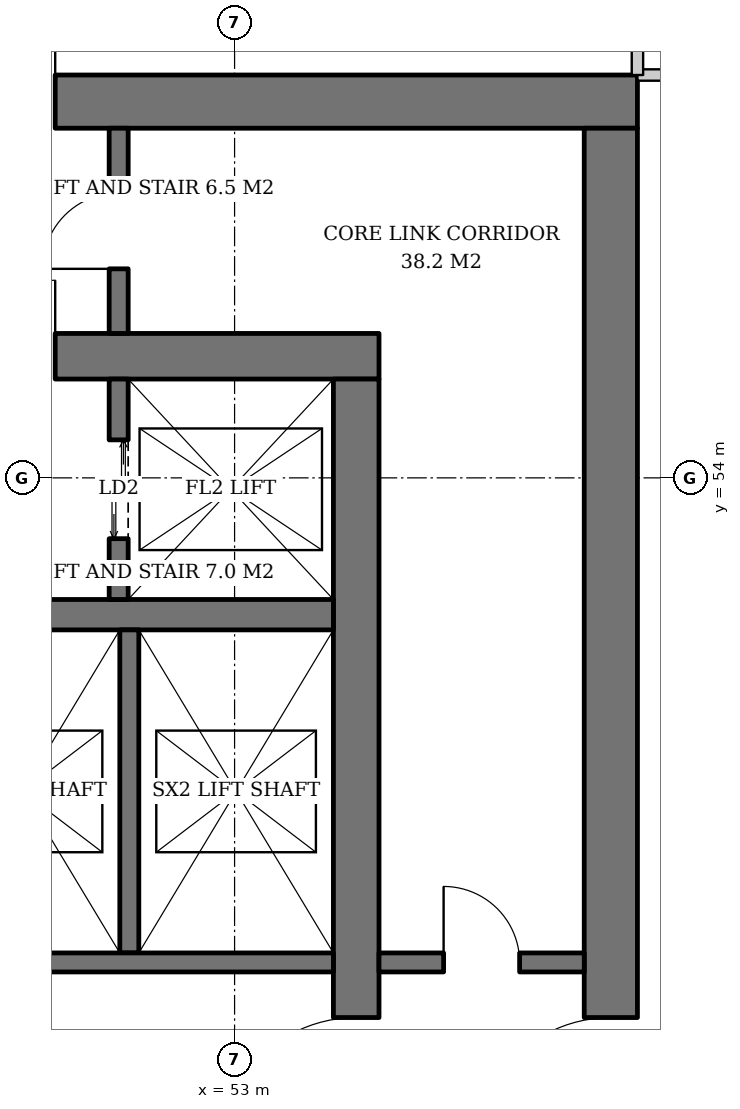
"""IFC4 building model, lengths in metres.
Left out: names, types, materials, properties, quantities, classifications, styles, units other than length and angle.
Written with IfcOpenShell. Run it as: python <this file> out.ifc"""

import sys

from ifc_helpers import new_model, si_unit, direction, frame, frame_2d, origin, origin_2d, place, context, subcontext, project, spatial, rectangle, extrude, element, fill, save


model = new_model("IFC4")
c1 = context("Model", 3, precision=1e-05, world=origin(), true_north=direction((0.0, 1.0)))
c2 = subcontext(c1, "Body", "Model", "MODEL_VIEW")
j1 = project(units=[si_unit("LENGTHUNIT", "METRE"), si_unit("PLANEANGLEUNIT", "RADIAN")], contexts=[c1])
p1 = place(None, origin())
s1 = spatial("IfcSite", under=j1, at=p1, CompositionType="ELEMENT")
p2 = place(p1, origin())
s2 = spatial("IfcBuilding", under=s1, at=p2, CompositionType="ELEMENT")
p3 = place(p2, frame((0.0, 0.0, 161.6)))
s3 = spatial("IfcBuildingStorey", under=s2, at=p3, CompositionType="ELEMENT", Elevation=161.6)
p4 = place(p3, frame((60.407, 61.407, 0.0), z_axis=(-0.031964207655, -0.031964207655, 0.998977766949), x_axis=(0.707106781187, -0.707106781187, 0.0)))
e1 = element("IfcColumn", 1, at=p4, inside=s3, PredefinedType="COLUMN", context=c2, shape_type="SweptSolid", body=[
    extrude(rectangle(XDim=2.4, YDim=2.4, at=origin_2d()), origin(), (0.0, 0.0, 1.0), 3.804),
])
p5 = place(p3, frame((35.1, 55.6, 0.0), z_axis=(0.0, 0.0, 1.0), x_axis=(1.0, 0.0, 0.0)))
e2 = element("IfcWall", 2, at=p5, inside=s3, PredefinedType="SHEAR", context=c2, shape_type="SweptSolid", body=[
    extrude(rectangle(XDim=19.8, YDim=0.6, at=frame_2d((9.9, 0.0))), origin(), (0.0, 0.0, 1.0), 3.8),
])
p6 = place(p5, frame((14.54, 0.0, 0.0)))
e3 = element("IfcOpeningElement", 3, at=p6, cuts=e2, PredefinedType="OPENING", context=c2, shape_type="SweptSolid", body=[
    extrude(rectangle(XDim=1.0, YDim=2.1, at=frame_2d((0.5, 1.05))), frame((0.0, 0.31, 0.0), z_axis=(0.0, -1.0, 0.0), x_axis=(1.0, 0.0, 0.0)), (0.0, 0.0, 1.0), 0.62),
])
p7 = place(p5, frame((2.425, 0.0, 0.0)))
e4 = element("IfcOpeningElement", 4, at=p7, cuts=e2, PredefinedType="OPENING", context=c2, shape_type="SweptSolid", body=[
    extrude(rectangle(XDim=1.0, YDim=2.1, at=frame_2d((0.5, 1.05))), frame((0.0, 0.31, 0.0), z_axis=(0.0, -1.0, 0.0), x_axis=(1.0, 0.0, 0.0)), (0.0, 0.0, 1.0), 0.62),
])
p8 = place(p3, frame((54.6, 36.7, 0.0), z_axis=(0.0, 0.0, 1.0), x_axis=(0.0, 1.0, 0.0)))
e5 = element("IfcWall", 5, at=p8, inside=s3, PredefinedType="SHEAR", context=c2, shape_type="SweptSolid", body=[
    extrude(rectangle(XDim=18.6, YDim=0.6, at=frame_2d((9.3, 0.0))), origin(), (0.0, 0.0, 1.0), 3.8),
])
p9 = place(p8, frame((8.4, 0.0, 0.0)))
e6 = element("IfcOpeningElement", 6, at=p9, cuts=e5, PredefinedType="OPENING", context=c2, shape_type="SweptSolid", body=[
    extrude(rectangle(XDim=1.8, YDim=2.4, at=frame_2d((0.9, 1.2))), frame((0.0, 0.31, 0.0), z_axis=(0.0, -1.0, 0.0), x_axis=(1.0, 0.0, 0.0)), (0.0, 0.0, 1.0), 0.62),
])
p10 = place(p3, frame((31.7, 58.95, 0.0), z_axis=(0.0, 0.0, 1.0), x_axis=(1.0, 0.0, 0.0)))
e7 = element("IfcWall", 7, at=p10, inside=s3, PredefinedType="SHEAR", context=c2, shape_type="SweptSolid", body=[
    extrude(rectangle(XDim=26.6, YDim=0.7, at=frame_2d((13.3, 0.0))), origin(), (0.0, 0.0, 1.0), 3.8),
])
p11 = place(p10, frame((17.94, 0.0, 0.0)))
e8 = element("IfcOpeningElement", 8, at=p11, cuts=e7, PredefinedType="OPENING", context=c2, shape_type="SweptSolid", body=[
    extrude(rectangle(XDim=1.0, YDim=2.1, at=frame_2d((0.5, 1.05))), frame((0.0, 0.36, 0.0), z_axis=(0.0, -1.0, 0.0), x_axis=(1.0, 0.0, 0.0)), (0.0, 0.0, 1.0), 0.72),
])
p12 = place(p10, frame((5.825, 0.0, 0.0)))
e9 = element("IfcOpeningElement", 9, at=p12, cuts=e7, PredefinedType="OPENING", context=c2, shape_type="SweptSolid", body=[
    extrude(rectangle(XDim=1.0, YDim=2.1, at=frame_2d((0.5, 1.05))), frame((0.0, 0.36, 0.0), z_axis=(0.0, -1.0, 0.0), x_axis=(1.0, 0.0, 0.0)), (0.0, 0.0, 1.0), 0.72),
])
p13 = place(p10, frame((1.837, 0.0, 0.0)))
e10 = element("IfcOpeningElement", 10, at=p13, cuts=e7, PredefinedType="OPENING", context=c2, shape_type="SweptSolid", body=[
    extrude(rectangle(XDim=1.0, YDim=2.1, at=frame_2d((0.5, 1.05))), frame((0.0, 0.36, 0.0), z_axis=(0.0, -1.0, 0.0), x_axis=(1.0, 0.0, 0.0)), (0.0, 0.0, 1.0), 0.72),
])
p14 = place(p10, frame((3.781, 0.0, 0.0)))
e11 = element("IfcOpeningElement", 11, at=p14, cuts=e7, PredefinedType="OPENING", context=c2, shape_type="SweptSolid", body=[
    extrude(rectangle(XDim=1.0, YDim=2.1, at=frame_2d((0.5, 1.05))), frame((0.0, 0.36, 0.0), z_axis=(0.0, -1.0, 0.0), x_axis=(1.0, 0.0, 0.0)), (0.0, 0.0, 1.0), 0.72),
])
p15 = place(p3, frame((57.95, 33.4, 0.0), z_axis=(0.0, 0.0, 1.0), x_axis=(0.0, 1.0, 0.0)))
e12 = element("IfcWall", 12, at=p15, inside=s3, PredefinedType="SHEAR", context=c2, shape_type="SweptSolid", body=[
    extrude(rectangle(XDim=25.2, YDim=0.7, at=frame_2d((12.6, 0.0))), origin(), (0.0, 0.0, 1.0), 3.8),
])
p16 = place(p15, frame((11.7, 0.0, 0.0)))
e13 = element("IfcOpeningElement", 13, at=p16, cuts=e12, PredefinedType="OPENING", context=c2, shape_type="SweptSolid", body=[
    extrude(rectangle(XDim=1.8, YDim=2.4, at=frame_2d((0.9, 1.2))), frame((0.0, 0.36, 0.0), z_axis=(0.0, -1.0, 0.0), x_axis=(1.0, 0.0, 0.0)), (0.0, 0.0, 1.0), 0.72),
])
p17 = place(p3, frame((35.7, 52.2, 0.0), z_axis=(0.0, 0.0, 1.0), x_axis=(1.0, 0.0, 0.0)))
e14 = element("IfcWall", 14, at=p17, inside=s3, PredefinedType="SHEAR", context=c2, shape_type="SweptSolid", body=[
    extrude(rectangle(XDim=18.6, YDim=0.4, at=frame_2d((9.3, 0.0))), origin(), (0.0, 0.0, 1.0), 3.8),
])
p18 = place(p3, frame((51.475, 52.4, 0.0), z_axis=(0.0, 0.0, 1.0), x_axis=(0.0, 1.0, 0.0)))
e15 = element("IfcWall", 15, at=p18, inside=s3, PredefinedType="SHEAR", context=c2, shape_type="SweptSolid", body=[
    extrude(rectangle(XDim=2.9, YDim=0.25, at=frame_2d((1.45, 0.0))), origin(), (0.0, 0.0, 1.0), 3.8),
])
p19 = place(p18, frame((0.8, 0.0, 0.0)))
e16 = element("IfcOpeningElement", 16, at=p19, cuts=e15, PredefinedType="OPENING", context=c2, shape_type="SweptSolid", body=[
    extrude(rectangle(XDim=1.3, YDim=2.2, at=frame_2d((0.65, 1.1))), frame((0.0, 0.135, 0.0), z_axis=(0.0, -1.0, 0.0), x_axis=(1.0, 0.0, 0.0)), (0.0, 0.0, 1.0), 0.27),
])
p20 = place(p3, frame((51.615, 47.75, 0.0), z_axis=(0.0, 0.0, 1.0), x_axis=(0.0, 1.0, 0.0)))
e17 = element("IfcWall", 17, at=p20, inside=s3, PredefinedType="SHEAR", context=c2, shape_type="SweptSolid", body=[
    extrude(rectangle(XDim=4.25, YDim=0.25, at=frame_2d((2.125, 0.0))), origin(), (0.0, 0.0, 1.0), 3.8),
])
p21 = place(p3, frame((48.93, 47.625, 0.0), z_axis=(0.0, 0.0, 1.0), x_axis=(1.0, 0.0, 0.0)))
e18 = element("IfcWall", 18, at=p21, inside=s3, PredefinedType="SHEAR", context=c2, shape_type="SweptSolid", body=[
    extrude(rectangle(XDim=5.37, YDim=0.25, at=frame_2d((2.685, 0.0))), origin(), (0.0, 0.0, 1.0), 3.8),
])
p22 = place(p3, frame((51.475, 55.9, 0.0), z_axis=(0.0, 0.0, 1.0), x_axis=(0.0, 1.0, 0.0)))
e19 = element("IfcWall", 19, at=p22, inside=s3, PredefinedType="SOLIDWALL", context=c2, shape_type="SweptSolid", body=[
    extrude(rectangle(XDim=2.7, YDim=0.25, at=frame_2d((1.35, 0.0))), origin(), (0.0, 0.0, 1.0), 3.2),
])
p23 = place(p22, frame((0.85, 0.0, 0.0)))
e20 = element("IfcOpeningElement", 20, at=p23, cuts=e19, PredefinedType="OPENING", context=c2, shape_type="SweptSolid", body=[
    extrude(rectangle(XDim=1.0, YDim=2.1, at=frame_2d((0.5, 1.05))), frame((0.0, 0.135, 0.0), z_axis=(0.0, -1.0, 0.0), x_axis=(1.0, 0.0, 0.0)), (0.0, 0.0, 1.0), 0.27),
])
p24 = place(p3, frame((54.9, 47.625, 0.0), z_axis=(0.0, 0.0, 1.0), x_axis=(1.0, 0.0, 0.0)))
e21 = element("IfcWall", 21, at=p24, inside=s3, PredefinedType="SOLIDWALL", context=c2, shape_type="SweptSolid", body=[
    extrude(rectangle(XDim=2.7, YDim=0.25, at=frame_2d((1.35, 0.0))), origin(), (0.0, 0.0, 1.0), 3.2),
])
p25 = place(p24, frame((0.85, 0.0, 0.0)))
e22 = element("IfcOpeningElement", 22, at=p25, cuts=e21, PredefinedType="OPENING", context=c2, shape_type="SweptSolid", body=[
    extrude(rectangle(XDim=1.0, YDim=2.1, at=frame_2d((0.5, 1.05))), frame((0.0, 0.135, 0.0), z_axis=(0.0, -1.0, 0.0), x_axis=(1.0, 0.0, 0.0)), (0.0, 0.0, 1.0), 0.27),
])
for number, where, z_axis, x_axis in (
    (23, (58.3, 59.3, 0.0), (0.0, 0.0, 1.0), (1.0, 0.0, 0.0)),
    (24, (58.3, 59.3, 0.0), (0.0, 0.0, 1.0), (0.0, 1.0, 0.0)),
):
    element("IfcWall", number, at=place(p3, frame(where, z_axis=z_axis, x_axis=x_axis)), inside=s3, PredefinedType="PARTITIONING", context=c2, shape_type="SweptSolid", body=[
        extrude(rectangle(XDim=1.829, YDim=0.15, at=frame_2d((0.915, 0.0))), origin(), (0.0, 0.0, 1.0), 3.6),
    ])
p26 = place(p19, origin())
e25 = element("IfcDoor", 25, at=p26, inside=s3, OperationType="DOUBLE_DOOR_SLIDING", PredefinedType="DOOR", context=c2, shape_type="SweptSolid", body=[
    extrude(rectangle(XDim=1.3, YDim=2.2, at=frame_2d((0.65, 1.1))), frame((0.0, 0.025, 0.0), z_axis=(0.0, -1.0, 0.0), x_axis=(1.0, 0.0, 0.0)), (0.0, 0.0, 1.0), 0.05),
])
fill(e16, e25)
p27 = place(p23, origin())
e26 = element("IfcDoor", 26, at=p27, inside=s3, OperationType="SINGLE_SWING_LEFT", PredefinedType="DOOR", context=c2, shape_type="SweptSolid", body=[
    extrude(rectangle(XDim=1.0, YDim=2.1, at=frame_2d((0.5, 1.05))), frame((0.0, 0.025, 0.0), z_axis=(0.0, -1.0, 0.0), x_axis=(1.0, 0.0, 0.0)), (0.0, 0.0, 1.0), 0.05),
])
fill(e20, e26)
p28 = place(p25, origin())
e27 = element("IfcDoor", 27, at=p28, inside=s3, OperationType="SINGLE_SWING_LEFT", PredefinedType="DOOR", context=c2, shape_type="SweptSolid", body=[
    extrude(rectangle(XDim=1.0, YDim=2.1, at=frame_2d((0.5, 1.05))), frame((0.0, 0.025, 0.0), z_axis=(0.0, -1.0, 0.0), x_axis=(1.0, 0.0, 0.0)), (0.0, 0.0, 1.0), 0.05),
])
fill(e22, e27)
p29 = place(p6, origin())
e28 = element("IfcDoor", 28, at=p29, inside=s3, OperationType="SINGLE_SWING_RIGHT", PredefinedType="DOOR", context=c2, shape_type="SweptSolid", body=[
    extrude(rectangle(XDim=1.0, YDim=2.1, at=frame_2d((0.5, 1.05))), frame((0.0, 0.025, 0.0), z_axis=(0.0, -1.0, 0.0), x_axis=(1.0, 0.0, 0.0)), (0.0, 0.0, 1.0), 0.05),
])
fill(e3, e28)
p30 = place(p9, origin())
e29 = element("IfcDoor", 29, at=p30, inside=s3, OperationType="DOUBLE_DOOR_SINGLE_SWING", PredefinedType="DOOR", context=c2, shape_type="SweptSolid", body=[
    extrude(rectangle(XDim=1.8, YDim=2.4, at=frame_2d((0.9, 1.2))), frame((0.0, 0.025, 0.0), z_axis=(0.0, -1.0, 0.0), x_axis=(1.0, 0.0, 0.0)), (0.0, 0.0, 1.0), 0.05),
])
fill(e6, e29)
p31 = place(p16, origin())
e30 = element("IfcDoor", 30, at=p31, inside=s3, OperationType="DOUBLE_DOOR_SINGLE_SWING", PredefinedType="DOOR", context=c2, shape_type="SweptSolid", body=[
    extrude(rectangle(XDim=1.8, YDim=2.4, at=frame_2d((0.9, 1.2))), frame((0.0, 0.025, 0.0), z_axis=(0.0, -1.0, 0.0), x_axis=(1.0, 0.0, 0.0)), (0.0, 0.0, 1.0), 0.05),
])
fill(e13, e30)
p32 = place(p11, origin())
e31 = element("IfcDoor", 31, at=p32, inside=s3, OperationType="SINGLE_SWING_RIGHT", PredefinedType="DOOR", context=c2, shape_type="SweptSolid", body=[
    extrude(rectangle(XDim=1.0, YDim=2.1, at=frame_2d((0.5, 1.05))), frame((0.0, 0.025, 0.0), z_axis=(0.0, -1.0, 0.0), x_axis=(1.0, 0.0, 0.0)), (0.0, 0.0, 1.0), 0.05),
])
fill(e8, e31)
save(model, sys.argv[1])
